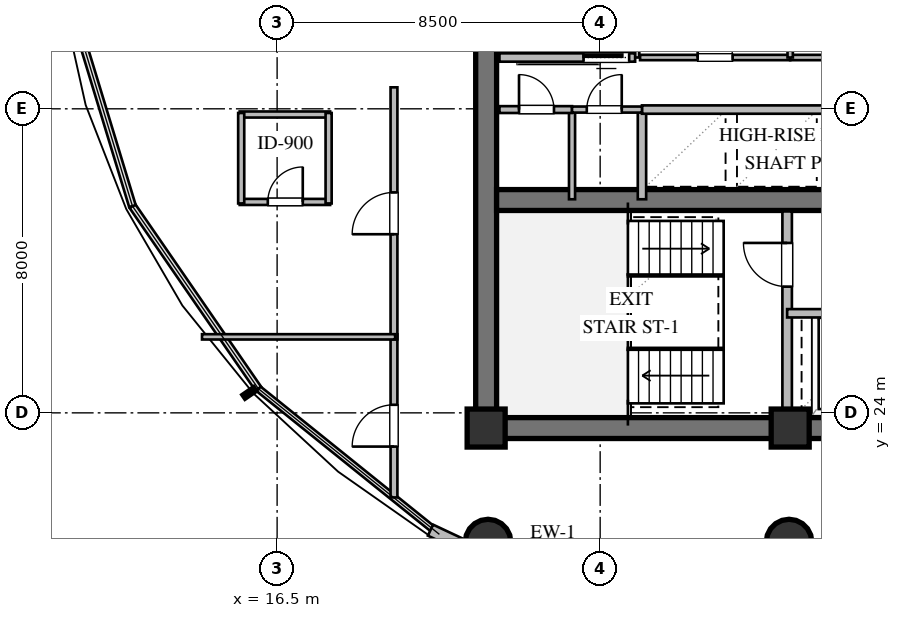
"""IFC4 building model, lengths in metres.
Left out: names, types, materials, properties, quantities, classifications, styles, units other than length and angle.
Written with IfcOpenShell. Run it as: python <this file> out.ifc"""

import sys

from ifc_helpers import new_model, si_unit, direction, frame, frame_2d, origin, origin_2d, place, context, subcontext, project, spatial, rectangle, circle, extrude, element, fill, save


model = new_model("IFC4")
c1 = context("Model", 3, precision=1e-05, world=origin(), true_north=direction((0.0, 1.0)))
c2 = subcontext(c1, "Body", "Model", "MODEL_VIEW")
j1 = project(units=[si_unit("LENGTHUNIT", "METRE"), si_unit("PLANEANGLEUNIT", "RADIAN")], contexts=[c1])
p1 = place(None, origin())
s1 = spatial("IfcSite", under=j1, at=p1, CompositionType="ELEMENT")
p2 = place(p1, origin())
s2 = spatial("IfcBuilding", under=s1, at=p2, CompositionType="ELEMENT")
p3 = place(p2, frame((0.0, 0.0, 171.0)))
s3 = spatial("IfcBuildingStorey", under=s2, at=p3, CompositionType="ELEMENT", Elevation=171.0)
p4 = place(p3, frame((21.725, 23.6, 0.0), z_axis=(0.0, 0.0, 1.0), x_axis=(1.0, 0.0, 0.0)))
e1 = element("IfcWall", 1, at=p4, inside=s3, PredefinedType="SHEAR", context=c2, shape_type="SweptSolid", body=[
    extrude(rectangle(XDim=22.55, YDim=0.55, at=frame_2d((11.275, 0.0))), origin(), (0.0, 0.0, 1.0), 3.36),
])
p5 = place(p3, frame((22.0, 23.875, 0.0), z_axis=(0.0, 0.0, 1.0), x_axis=(0.0, 1.0, 0.0)))
e2 = element("IfcWall", 2, at=p5, inside=s3, PredefinedType="SHEAR", context=c2, shape_type="SweptSolid", body=[
    extrude(rectangle(XDim=12.25, YDim=0.55, at=frame_2d((6.125, 0.0))), origin(), (0.0, 0.0, 1.0), 3.36),
])
p6 = place(p3, frame((22.275, 29.6, 0.0), z_axis=(0.0, 0.0, 1.0), x_axis=(1.0, 0.0, 0.0)))
e3 = element("IfcWall", 3, at=p6, inside=s3, PredefinedType="SHEAR", context=c2, shape_type="SweptSolid", body=[
    extrude(rectangle(XDim=21.45, YDim=0.55, at=frame_2d((10.725, 0.0))), origin(), (0.0, 0.0, 1.0), 3.36),
])
p7 = place(p6, frame((12.175, 0.0, 0.0)))
e4 = element("IfcOpeningElement", 4, at=p7, cuts=e3, PredefinedType="OPENING", context=c2, shape_type="SweptSolid", body=[
    extrude(rectangle(XDim=1.15, YDim=2.1, at=frame_2d((0.575, 1.05))), frame((0.0, 0.285, 0.0), z_axis=(0.0, -1.0, 0.0), x_axis=(1.0, 0.0, 0.0)), (0.0, 0.0, 1.0), 0.57),
])
for number, where, z_axis, x_axis in (
    (5, (22.0, 23.6, 0.0), (0.0, 0.0, 1.0), (1.0, 0.0, 0.0)),
    (6, (30.0, 23.6, 0.0), (0.0, 0.0, 1.0), (1.0, 0.0, 0.0)),
):
    element("IfcColumn", number, at=place(p3, frame(where, z_axis=z_axis, x_axis=x_axis)), inside=s3, PredefinedType="COLUMN", context=c2, shape_type="SweptSolid", body=[
        extrude(rectangle(XDim=1.0, YDim=1.0, at=origin_2d()), origin(), (0.0, 0.0, 1.0), 3.6),
    ])
for number, where, z_axis, x_axis in (
    (7, (22.05, 20.6, 0.0), (0.0, 0.0, 1.0), (1.0, 0.0, 0.0)),
    (8, (29.97, 20.6, 0.0), (0.0, 0.0, 1.0), (1.0, 0.0, 0.0)),
):
    element("IfcColumn", number, at=place(p3, frame(where, z_axis=z_axis, x_axis=x_axis)), inside=s3, PredefinedType="COLUMN", context=c2, shape_type="SweptSolid", body=[
        extrude(circle(Radius=0.6, at=origin_2d()), origin(), (0.0, 0.0, 1.0), 3.6),
    ])
p8 = place(p3, frame((26.994, 17.88, 0.0), z_axis=(0.0, 0.0, 1.0), x_axis=(-0.905106920297, 0.425184034073, 0.0)))
e9 = element("IfcWall", 9, at=p8, inside=s3, PredefinedType="STANDARD", context=c2, shape_type="SweptSolid", body=[
    extrude(rectangle(XDim=7.136, YDim=0.32, at=frame_2d((3.568, 0.0))), origin(), (0.0, 0.0, 1.0), 2.657),
])
p9 = place(p3, frame((29.92, 23.9, 0.0), z_axis=(0.0, 0.0, 1.0), x_axis=(0.0, 1.0, 0.0)))
e10 = element("IfcWall", 10, at=p9, inside=s3, PredefinedType="SOLIDWALL", context=c2, shape_type="SweptSolid", body=[
    extrude(rectangle(XDim=5.4, YDim=0.25, at=frame_2d((2.7, 0.0))), origin(), (0.0, 0.0, 1.0), 2.89),
])
p10 = place(p9, frame((3.421, 0.0, 0.0)))
e11 = element("IfcOpeningElement", 11, at=p10, cuts=e10, PredefinedType="OPENING", context=c2, shape_type="SweptSolid", body=[
    extrude(rectangle(XDim=1.15, YDim=2.1, at=frame_2d((0.575, 1.05))), frame((0.0, 0.135, 0.0), z_axis=(0.0, -1.0, 0.0), x_axis=(1.0, 0.0, 0.0)), (0.0, 0.0, 1.0), 0.27),
])
p11 = place(p3, frame((29.92, 26.62, 0.0), z_axis=(0.0, 0.0, 1.0), x_axis=(1.0, 0.0, 0.0)))
e12 = element("IfcWall", 12, at=p11, inside=s3, PredefinedType="SOLIDWALL", context=c2, shape_type="SweptSolid", body=[
    extrude(rectangle(XDim=6.16, YDim=0.22, at=frame_2d((3.08, 0.0))), origin(), (0.0, 0.0, 1.0), 3.36),
])
p12 = place(p11, frame((0.99, 0.0, 0.0)))
e13 = element("IfcOpeningElement", 13, at=p12, cuts=e12, PredefinedType="OPENING", context=c2, shape_type="SweptSolid", body=[
    extrude(rectangle(XDim=1.1, YDim=2.1, at=frame_2d((0.55, 1.05))), frame((0.0, 0.12, 0.0), z_axis=(0.0, -1.0, 0.0), x_axis=(1.0, 0.0, 0.0)), (0.0, 0.0, 1.0), 0.24),
])
p13 = place(p11, frame((4.07, 0.0, 0.0)))
e14 = element("IfcOpeningElement", 14, at=p13, cuts=e12, PredefinedType="OPENING", context=c2, shape_type="SweptSolid", body=[
    extrude(rectangle(XDim=1.1, YDim=2.1, at=frame_2d((0.55, 1.05))), frame((0.0, 0.12, 0.0), z_axis=(0.0, -1.0, 0.0), x_axis=(1.0, 0.0, 0.0)), (0.0, 0.0, 1.0), 0.24),
])
p14 = place(p3, frame((25.92, 33.35, 0.0), z_axis=(0.0, 0.0, 1.0), x_axis=(0.0, 1.0, 0.0)))
e15 = element("IfcWall", 15, at=p14, inside=s3, PredefinedType="SOLIDWALL", context=c2, shape_type="SweptSolid", body=[
    extrude(rectangle(XDim=2.73, YDim=0.22, at=frame_2d((1.365, 0.0))), origin(), (0.0, 0.0, 1.0), 3.36),
])
p15 = place(p3, frame((22.35, 33.35, 0.0), z_axis=(0.0, 0.0, 1.0), x_axis=(1.0, 0.0, 0.0)))
e16 = element("IfcWall", 16, at=p15, inside=s3, PredefinedType="SOLIDWALL", context=c2, shape_type="SweptSolid", body=[
    extrude(rectangle(XDim=3.57, YDim=0.22, at=frame_2d((1.785, 0.0))), origin(), (0.0, 0.0, 1.0), 3.36),
])
p16 = place(p15, frame((2.213, 0.0, 0.0)))
e17 = element("IfcOpeningElement", 17, at=p16, cuts=e16, PredefinedType="OPENING", context=c2, shape_type="SweptSolid", body=[
    extrude(rectangle(XDim=1.2, YDim=2.1, at=frame_2d((0.6, 1.05))), frame((0.0, 0.12, 0.0), z_axis=(0.0, -1.0, 0.0), x_axis=(1.0, 0.0, 0.0)), (0.0, 0.0, 1.0), 0.24),
])
p17 = place(p3, frame((26.1, 29.62, 0.0), z_axis=(0.0, 0.0, 1.0), x_axis=(0.0, 1.0, 0.0)))
e18 = element("IfcWall", 18, at=p17, inside=s3, PredefinedType="SOLIDWALL", context=c2, shape_type="SweptSolid", body=[
    extrude(rectangle(XDim=2.36, YDim=0.22, at=frame_2d((1.18, 0.0))), origin(), (0.0, 0.0, 1.0), 3.36),
])
p18 = place(p3, frame((26.1, 31.98, 0.0), z_axis=(0.0, 0.0, 1.0), x_axis=(1.0, 0.0, 0.0)))
e19 = element("IfcWall", 19, at=p18, inside=s3, PredefinedType="SOLIDWALL", context=c2, shape_type="SweptSolid", body=[
    extrude(rectangle(XDim=7.8, YDim=0.22, at=frame_2d((3.9, 0.0))), origin(), (0.0, 0.0, 1.0), 3.36),
])
p19 = place(p3, frame((26.05, 33.35, 0.0), z_axis=(0.0, 0.0, 1.0), x_axis=(1.0, 0.0, 0.0)))
e20 = element("IfcWall", 20, at=p19, inside=s3, PredefinedType="PARTITIONING", context=c2, shape_type="SweptSolid", body=[
    extrude(rectangle(XDim=3.95, YDim=0.14, at=frame_2d((1.975, 0.0))), origin(), (0.0, 0.0, 1.0), 3.36),
])
p20 = place(p19, frame((1.515, 0.0, 0.0)))
e21 = element("IfcOpeningElement", 21, at=p20, cuts=e20, PredefinedType="OPENING", context=c2, shape_type="SweptSolid", body=[
    extrude(rectangle(XDim=0.92, YDim=2.1, at=frame_2d((0.46, 1.05))), frame((0.0, 0.08, 0.0), z_axis=(0.0, -1.0, 0.0), x_axis=(1.0, 0.0, 0.0)), (0.0, 0.0, 1.0), 0.16),
])
p21 = place(p3, frame((30.0, 33.35, 0.0), z_axis=(0.0, 0.0, 1.0), x_axis=(1.0, 0.0, 0.0)))
e22 = element("IfcWall", 22, at=p21, inside=s3, PredefinedType="PARTITIONING", context=c2, shape_type="SweptSolid", body=[
    extrude(rectangle(XDim=3.92, YDim=0.14, at=frame_2d((1.96, 0.0))), origin(), (0.0, 0.0, 1.0), 3.36),
])
p22 = place(p21, frame((1.5, 0.0, 0.0)))
e23 = element("IfcOpeningElement", 23, at=p22, cuts=e22, PredefinedType="OPENING", context=c2, shape_type="SweptSolid", body=[
    extrude(rectangle(XDim=0.92, YDim=2.1, at=frame_2d((0.46, 1.05))), frame((0.0, 0.08, 0.0), z_axis=(0.0, -1.0, 0.0), x_axis=(1.0, 0.0, 0.0)), (0.0, 0.0, 1.0), 0.16),
])
p23 = place(p3, frame((30.0, 33.35, 0.0), z_axis=(0.0, 0.0, 1.0), x_axis=(0.0, 1.0, 0.0)))
e24 = element("IfcWall", 24, at=p23, inside=s3, PredefinedType="PARTITIONING", context=c2, shape_type="SweptSolid", body=[
    extrude(rectangle(XDim=2.75, YDim=0.14, at=frame_2d((1.375, 0.0))), origin(), (0.0, 0.0, 1.0), 3.36),
])
p24 = place(p3, frame((24.26, 29.62, 0.0), z_axis=(0.0, 0.0, 1.0), x_axis=(0.0, 1.0, 0.0)))
e25 = element("IfcWall", 25, at=p24, inside=s3, PredefinedType="PLUMBINGWALL", context=c2, shape_type="SweptSolid", body=[
    extrude(rectangle(XDim=2.36, YDim=0.16, at=frame_2d((1.18, 0.0))), origin(), (0.0, 0.0, 1.0), 3.36),
])
p25 = place(p3, frame((22.35, 31.98, 0.0), z_axis=(0.0, 0.0, 1.0), x_axis=(1.0, 0.0, 0.0)))
e26 = element("IfcWall", 26, at=p25, inside=s3, PredefinedType="PARTITIONING", context=c2, shape_type="SweptSolid", body=[
    extrude(rectangle(XDim=1.91, YDim=0.18, at=frame_2d((0.955, 0.0))), origin(), (0.0, 0.0, 1.0), 3.36),
])
p26 = place(p25, frame((0.515, 0.0, 0.0)))
e27 = element("IfcOpeningElement", 27, at=p26, cuts=e26, PredefinedType="OPENING", context=c2, shape_type="SweptSolid", body=[
    extrude(rectangle(XDim=0.92, YDim=2.1, at=frame_2d((0.46, 1.05))), frame((0.0, 0.1, 0.0), z_axis=(0.0, -1.0, 0.0), x_axis=(1.0, 0.0, 0.0)), (0.0, 0.0, 1.0), 0.2),
])
p27 = place(p3, frame((24.26, 31.98, 0.0), z_axis=(0.0, 0.0, 1.0), x_axis=(1.0, 0.0, 0.0)))
e28 = element("IfcWall", 28, at=p27, inside=s3, PredefinedType="PLUMBINGWALL", context=c2, shape_type="SweptSolid", body=[
    extrude(rectangle(XDim=1.84, YDim=0.16, at=frame_2d((0.92, 0.0))), origin(), (0.0, 0.0, 1.0), 3.36),
])
p28 = place(p27, frame((0.388, 0.0, 0.0)))
e29 = element("IfcOpeningElement", 29, at=p28, cuts=e28, PredefinedType="OPENING", context=c2, shape_type="SweptSolid", body=[
    extrude(rectangle(XDim=0.92, YDim=2.1, at=frame_2d((0.46, 1.05))), frame((0.0, 0.09, 0.0), z_axis=(0.0, -1.0, 0.0), x_axis=(1.0, 0.0, 0.0)), (0.0, 0.0, 1.0), 0.18),
])
p29 = place(p3, frame((15.515, 29.55, 0.0), z_axis=(0.0, 0.0, 1.0), x_axis=(1.0, 0.0, 0.0)))
e30 = element("IfcWall", 30, at=p29, inside=s3, PredefinedType="PLUMBINGWALL", context=c2, shape_type="SweptSolid", body=[
    extrude(rectangle(XDim=2.38, YDim=0.16, at=frame_2d((1.19, 0.0))), origin(), (0.0, 0.0, 1.0), 3.36),
])
p30 = place(p29, frame((0.74, 0.0, 0.0)))
e31 = element("IfcOpeningElement", 31, at=p30, cuts=e30, PredefinedType="OPENING", context=c2, shape_type="SweptSolid", body=[
    extrude(rectangle(XDim=0.92, YDim=2.1, at=frame_2d((0.46, 1.05))), frame((0.0, 0.09, 0.0), z_axis=(0.0, -1.0, 0.0), x_axis=(1.0, 0.0, 0.0)), (0.0, 0.0, 1.0), 0.18),
])
p31 = place(p3, frame((15.515, 31.85, 0.0), z_axis=(0.0, 0.0, 1.0), x_axis=(1.0, 0.0, 0.0)))
e32 = element("IfcWall", 32, at=p31, inside=s3, PredefinedType="PLUMBINGWALL", context=c2, shape_type="SweptSolid", body=[
    extrude(rectangle(XDim=2.38, YDim=0.16, at=frame_2d((1.19, 0.0))), origin(), (0.0, 0.0, 1.0), 3.36),
])
for number, where, z_axis, x_axis in (
    (33, (15.555, 29.51, 0.0), (0.0, 0.0, 1.0), (0.0, 1.0, 0.0)),
    (34, (17.855, 29.51, 0.0), (0.0, 0.0, 1.0), (0.0, 1.0, 0.0)),
):
    element("IfcWall", number, at=place(p3, frame(where, z_axis=z_axis, x_axis=x_axis)), inside=s3, PredefinedType="PLUMBINGWALL", context=c2, shape_type="SweptSolid", body=[
        extrude(rectangle(XDim=2.38, YDim=0.16, at=frame_2d((1.19, 0.0))), origin(), (0.0, 0.0, 1.0), 3.36),
    ])
p32 = place(p3, frame((19.575, 21.775, 0.0), z_axis=(0.0, 0.0, 1.0), x_axis=(0.0, 1.0, 0.0)))
e35 = element("IfcWall", 35, at=p32, inside=s3, PredefinedType="PARTITIONING", context=c2, shape_type="SweptSolid", body=[
    extrude(rectangle(XDim=4.29, YDim=0.18, at=frame_2d((2.145, 0.0))), origin(), (0.0, 0.0, 1.0), 3.36),
])
p33 = place(p32, frame((1.338, 0.0, 0.0)))
e36 = element("IfcOpeningElement", 36, at=p33, cuts=e35, PredefinedType="OPENING", context=c2, shape_type="SweptSolid", body=[
    extrude(rectangle(XDim=1.1, YDim=2.1, at=frame_2d((0.55, 1.05))), frame((0.0, 0.1, 0.0), z_axis=(0.0, -1.0, 0.0), x_axis=(1.0, 0.0, 0.0)), (0.0, 0.0, 1.0), 0.2),
])
p34 = place(p3, frame((19.575, 25.935, 0.0), z_axis=(0.0, 0.0, 1.0), x_axis=(0.0, 1.0, 0.0)))
e37 = element("IfcWall", 37, at=p34, inside=s3, PredefinedType="PARTITIONING", context=c2, shape_type="SweptSolid", body=[
    extrude(rectangle(XDim=6.63, YDim=0.18, at=frame_2d((3.315, 0.0))), origin(), (0.0, 0.0, 1.0), 2.657),
])
p35 = place(p34, frame((2.765, 0.0, 0.0)))
e38 = element("IfcOpeningElement", 38, at=p35, cuts=e37, PredefinedType="OPENING", context=c2, shape_type="SweptSolid", body=[
    extrude(rectangle(XDim=1.1, YDim=2.1, at=frame_2d((0.55, 1.05))), frame((0.0, 0.1, 0.0), z_axis=(0.0, -1.0, 0.0), x_axis=(1.0, 0.0, 0.0)), (0.0, 0.0, 1.0), 0.2),
])
p36 = place(p3, frame((14.524, 26.0, 0.0), z_axis=(0.0, 0.0, 1.0), x_axis=(1.0, 0.0, 0.0)))
e39 = element("IfcWall", 39, at=p36, inside=s3, PredefinedType="PARTITIONING", context=c2, shape_type="SweptSolid", body=[
    extrude(rectangle(XDim=5.081, YDim=0.14, at=frame_2d((2.541, 0.0))), origin(), (0.0, 0.0, 1.0), 3.36),
])
p37 = place(p10, origin())
e40 = element("IfcDoor", 40, at=p37, inside=s3, OperationType="SINGLE_SWING_RIGHT", PredefinedType="DOOR", context=c2, shape_type="SweptSolid", body=[
    extrude(rectangle(XDim=1.15, YDim=2.1, at=frame_2d((0.575, 1.05))), frame((0.0, 0.025, 0.0), z_axis=(0.0, -1.0, 0.0), x_axis=(1.0, 0.0, 0.0)), (0.0, 0.0, 1.0), 0.05),
])
fill(e11, e40)
p38 = place(p16, origin())
e41 = element("IfcDoor", 41, at=p38, inside=s3, OperationType="SLIDING_TO_LEFT", PredefinedType="DOOR", context=c2, shape_type="SweptSolid", body=[
    extrude(rectangle(XDim=1.2, YDim=2.1, at=frame_2d((0.6, 1.05))), frame((0.0, 0.025, 0.0), z_axis=(0.0, -1.0, 0.0), x_axis=(1.0, 0.0, 0.0)), (0.0, 0.0, 1.0), 0.05),
])
fill(e17, e41)
p39 = place(p20, origin())
e42 = element("IfcDoor", 42, at=p39, inside=s3, OperationType="SINGLE_SWING_LEFT", PredefinedType="DOOR", context=c2, shape_type="SweptSolid", body=[
    extrude(rectangle(XDim=0.92, YDim=2.1, at=frame_2d((0.46, 1.05))), frame((0.0, 0.025, 0.0), z_axis=(0.0, -1.0, 0.0), x_axis=(1.0, 0.0, 0.0)), (0.0, 0.0, 1.0), 0.05),
])
fill(e21, e42)
p40 = place(p26, origin())
e43 = element("IfcDoor", 43, at=p40, inside=s3, OperationType="SINGLE_SWING_LEFT", PredefinedType="DOOR", context=c2, shape_type="SweptSolid", body=[
    extrude(rectangle(XDim=0.92, YDim=2.1, at=frame_2d((0.46, 1.05))), frame((0.0, 0.025, 0.0), z_axis=(0.0, -1.0, 0.0), x_axis=(1.0, 0.0, 0.0)), (0.0, 0.0, 1.0), 0.05),
])
fill(e27, e43)
p41 = place(p28, origin())
e44 = element("IfcDoor", 44, at=p41, inside=s3, OperationType="SINGLE_SWING_RIGHT", PredefinedType="DOOR", context=c2, shape_type="SweptSolid", body=[
    extrude(rectangle(XDim=0.92, YDim=2.1, at=frame_2d((0.46, 1.05))), frame((0.0, 0.025, 0.0), z_axis=(0.0, -1.0, 0.0), x_axis=(1.0, 0.0, 0.0)), (0.0, 0.0, 1.0), 0.05),
])
fill(e29, e44)
p42 = place(p30, origin())
e45 = element("IfcDoor", 45, at=p42, inside=s3, OperationType="SINGLE_SWING_RIGHT", PredefinedType="DOOR", context=c2, shape_type="SweptSolid", body=[
    extrude(rectangle(XDim=0.92, YDim=2.1, at=frame_2d((0.46, 1.05))), frame((0.0, 0.025, 0.0), z_axis=(0.0, -1.0, 0.0), x_axis=(1.0, 0.0, 0.0)), (0.0, 0.0, 1.0), 0.05),
])
fill(e31, e45)
p43 = place(p33, origin())
e46 = element("IfcDoor", 46, at=p43, inside=s3, OperationType="SINGLE_SWING_LEFT", PredefinedType="DOOR", context=c2, shape_type="SweptSolid", body=[
    extrude(rectangle(XDim=1.1, YDim=2.1, at=frame_2d((0.55, 1.05))), frame((0.0, 0.025, 0.0), z_axis=(0.0, -1.0, 0.0), x_axis=(1.0, 0.0, 0.0)), (0.0, 0.0, 1.0), 0.05),
])
fill(e36, e46)
p44 = place(p35, origin())
e47 = element("IfcDoor", 47, at=p44, inside=s3, OperationType="SINGLE_SWING_LEFT", PredefinedType="DOOR", context=c2, shape_type="SweptSolid", body=[
    extrude(rectangle(XDim=1.1, YDim=2.1, at=frame_2d((0.55, 1.05))), frame((0.0, 0.025, 0.0), z_axis=(0.0, -1.0, 0.0), x_axis=(1.0, 0.0, 0.0)), (0.0, 0.0, 1.0), 0.05),
])
fill(e38, e47)
save(model, sys.argv[1])
